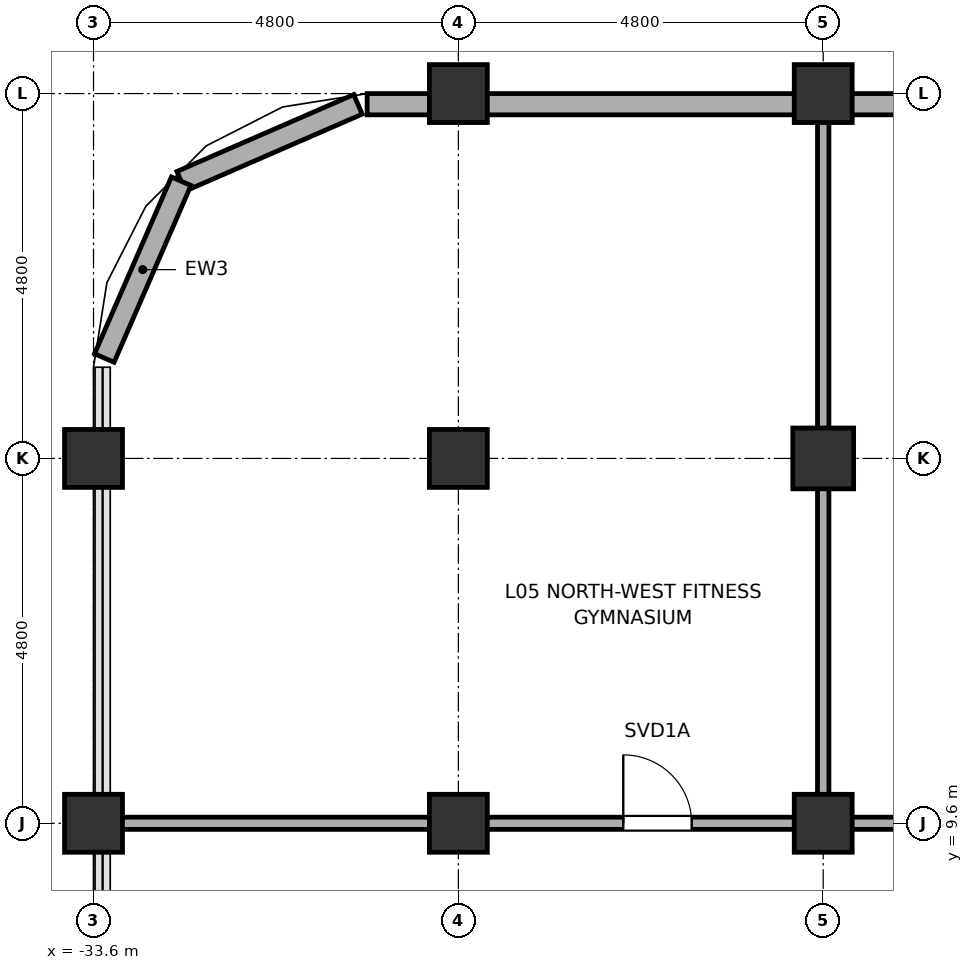
"""IFC4 building model, lengths in metres.
Left out: names, types, materials, properties, quantities, classifications, styles, units other than length and angle.
Written with IfcOpenShell. Run it as: python <this file> out.ifc"""

import sys

from ifc_helpers import new_model, si_unit, direction, frame, frame_2d, origin, origin_2d, place, context, subcontext, project, spatial, rectangle, hollow_rectangle, hollow_circle, extrude, element, fill, save


model = new_model("IFC4")
c1 = context("Model", 3, precision=1e-05, world=origin(), true_north=direction((0.0, 1.0)))
c2 = subcontext(c1, "Body", "Model", "MODEL_VIEW")
j1 = project(units=[si_unit("LENGTHUNIT", "METRE"), si_unit("PLANEANGLEUNIT", "RADIAN")], contexts=[c1])
p1 = place(None, origin())
s1 = spatial("IfcSite", under=j1, at=p1, CompositionType="ELEMENT")
p2 = place(p1, origin())
s2 = spatial("IfcBuilding", under=s1, at=p2, CompositionType="ELEMENT")
p3 = place(p2, frame((0.0, 0.0, 30.0)))
s3 = spatial("IfcBuildingStorey", under=s2, at=p3, CompositionType="ELEMENT", Elevation=30.0)
for number, where, z_axis, x_axis in (
    (1, (-33.6, 9.6, -0.18), (0.0, 0.0, 1.0), (1.0, 0.0, 0.0)),
    (2, (-33.6, 14.4, -0.18), (0.0, 0.0, 1.0), (1.0, 0.0, 0.0)),
):
    element("IfcColumn", number, at=place(p3, frame(where, z_axis=z_axis, x_axis=x_axis)), inside=s3, PredefinedType="COLUMN", context=c2, shape_type="SweptSolid", body=[
        extrude(hollow_circle(Radius=0.381, WallThickness=0.032, at=origin_2d()), origin(), (0.0, 0.0, 1.0), 3.88),
    ])
for number, where, z_axis, x_axis in (
    (3, (-28.8, 9.6, 0.0), (0.0, 0.0, 1.0), (1.0, 0.0, 0.0)),
    (4, (-28.8, 14.4, 0.0), (0.0, 0.0, 1.0), (1.0, 0.0, 0.0)),
    (5, (-28.8, 19.2, 0.0), (0.0, 0.0, 1.0), (1.0, 0.0, 0.0)),
    (6, (-24.0, 9.6, 0.0), (0.0, 0.0, 1.0), (1.0, 0.0, 0.0)),
):
    element("IfcColumn", number, at=place(p3, frame(where, z_axis=z_axis, x_axis=x_axis)), inside=s3, PredefinedType="COLUMN", context=c2, shape_type="SweptSolid", body=[
        extrude(hollow_circle(Radius=0.381, WallThickness=0.032, at=origin_2d()), origin(), (0.0, 0.0, 1.0), 3.7),
    ])
p4 = place(p3, frame((-24.0, 14.4, 0.0), z_axis=(0.0, 0.0, 1.0), x_axis=(1.0, 0.0, 0.0)))
e7 = element("IfcColumn", 7, at=p4, inside=s3, PredefinedType="COLUMN", context=c2, shape_type="SweptSolid", body=[
    extrude(hollow_rectangle(XDim=0.8, YDim=0.8, WallThickness=0.036, at=origin_2d()), origin(), (0.0, 0.0, 1.0), 3.7),
])
p5 = place(p3, frame((-24.0, 19.2, 0.0), z_axis=(0.0, 0.0, 1.0), x_axis=(1.0, 0.0, 0.0)))
e8 = element("IfcColumn", 8, at=p5, inside=s3, PredefinedType="COLUMN", context=c2, shape_type="SweptSolid", body=[
    extrude(hollow_circle(Radius=0.381, WallThickness=0.032, at=origin_2d()), origin(), (0.0, 0.0, 1.0), 3.7),
])
p6 = place(p3, frame((-30.121, 19.058, 0.0), z_axis=(0.0, 0.0, 1.0), x_axis=(-0.917060872934, -0.398747232384, 0.0)))
e9 = element("IfcWall", 9, at=p6, inside=s3, PredefinedType="SOLIDWALL", context=c2, shape_type="SweptSolid", body=[
    extrude(rectangle(XDim=2.536, YDim=0.28, at=frame_2d((1.268, 0.0))), origin(), (0.0, 0.0, 1.0), 2.12),
])
p7 = place(p3, frame((-32.447, 18.047, 0.0), z_axis=(0.0, 0.0, 1.0), x_axis=(-0.398792985289, -0.917040977756, 0.0)))
e10 = element("IfcWall", 10, at=p7, inside=s3, PredefinedType="SOLIDWALL", context=c2, shape_type="SweptSolid", body=[
    extrude(rectangle(XDim=2.536, YDim=0.28, at=frame_2d((1.268, 0.0))), origin(), (0.0, 0.0, 1.0), 2.12),
])
p8 = place(p3, frame((-30.0, 19.06, 0.0), z_axis=(0.0, 0.0, 1.0), x_axis=(1.0, 0.0, 0.0)))
e11 = element("IfcWall", 11, at=p8, inside=s3, PredefinedType="SOLIDWALL", context=c2, shape_type="SweptSolid", body=[
    extrude(rectangle(XDim=25.25, YDim=0.28, at=frame_2d((12.625, 0.0))), origin(), (0.0, 0.0, 1.0), 2.12),
])
p9 = place(p8, frame((17.1, 0.0, 0.0)))
e12 = element("IfcOpeningElement", 12, at=p9, cuts=e11, PredefinedType="OPENING", context=c2, shape_type="SweptSolid", body=[
    extrude(rectangle(XDim=1.8, YDim=2.02, at=frame_2d((0.9, 1.01))), frame((0.0, 0.155, 0.0), z_axis=(0.0, -1.0, 0.0), x_axis=(1.0, 0.0, 0.0)), (0.0, 0.0, 1.0), 0.31),
])
p10 = place(p8, frame((9.0, 0.0, 0.75)))
e13 = element("IfcOpeningElement", 13, at=p10, cuts=e11, PredefinedType="OPENING", context=c2, shape_type="SweptSolid", body=[
    extrude(rectangle(XDim=1.2, YDim=1.15, at=frame_2d((0.6, 0.575))), frame((0.0, 0.155, 0.0), z_axis=(0.0, -1.0, 0.0), x_axis=(1.0, 0.0, 0.0)), (0.0, 0.0, 1.0), 0.31),
])
p11 = place(p8, frame((12.3, 0.0, 0.75)))
e14 = element("IfcOpeningElement", 14, at=p11, cuts=e11, PredefinedType="OPENING", context=c2, shape_type="SweptSolid", body=[
    extrude(rectangle(XDim=1.8, YDim=1.15, at=frame_2d((0.9, 0.575))), frame((0.0, 0.155, 0.0), z_axis=(0.0, -1.0, 0.0), x_axis=(1.0, 0.0, 0.0)), (0.0, 0.0, 1.0), 0.31),
])
p12 = place(p8, frame((21.9, 0.0, 0.75)))
e15 = element("IfcOpeningElement", 15, at=p12, cuts=e11, PredefinedType="OPENING", context=c2, shape_type="SweptSolid", body=[
    extrude(rectangle(XDim=1.8, YDim=1.15, at=frame_2d((0.9, 0.575))), frame((0.0, 0.155, 0.0), z_axis=(0.0, -1.0, 0.0), x_axis=(1.0, 0.0, 0.0)), (0.0, 0.0, 1.0), 0.31),
])
p13 = place(p3, frame((-33.43, 9.6, 0.0), z_axis=(0.0, 0.0, 1.0), x_axis=(1.0, 0.0, 0.0)))
e16 = element("IfcWall", 16, at=p13, inside=s3, PredefinedType="PARTITIONING", context=c2, shape_type="SweptSolid", body=[
    extrude(rectangle(XDim=62.06, YDim=0.16, at=frame_2d((31.03, 0.0))), origin(), (0.0, 0.0, 1.0), 2.12),
])
p14 = place(p13, frame((6.8, 0.0, 0.0)))
e17 = element("IfcOpeningElement", 17, at=p14, cuts=e16, PredefinedType="OPENING", context=c2, shape_type="SweptSolid", body=[
    extrude(rectangle(XDim=0.9, YDim=2.02, at=frame_2d((0.45, 1.01))), frame((0.0, 0.095, 0.0), z_axis=(0.0, -1.0, 0.0), x_axis=(1.0, 0.0, 0.0)), (0.0, 0.0, 1.0), 0.19),
])
p15 = place(p13, frame((54.361, 0.0, 0.0)))
e18 = element("IfcOpeningElement", 18, at=p15, cuts=e16, PredefinedType="OPENING", context=c2, shape_type="SweptSolid", body=[
    extrude(rectangle(XDim=0.9, YDim=2.02, at=frame_2d((0.45, 1.01))), frame((0.0, 0.095, 0.0), z_axis=(0.0, -1.0, 0.0), x_axis=(1.0, 0.0, 0.0)), (0.0, 0.0, 1.0), 0.19),
])
p16 = place(p13, frame((10.69, 0.0, 0.0)))
e19 = element("IfcOpeningElement", 19, at=p16, cuts=e16, PredefinedType="OPENING", context=c2, shape_type="SweptSolid", body=[
    extrude(rectangle(XDim=0.9, YDim=2.02, at=frame_2d((0.45, 1.01))), frame((0.0, 0.095, 0.0), z_axis=(0.0, -1.0, 0.0), x_axis=(1.0, 0.0, 0.0)), (0.0, 0.0, 1.0), 0.19),
])
p17 = place(p13, frame((12.07, 0.0, 0.0)))
e20 = element("IfcOpeningElement", 20, at=p17, cuts=e16, PredefinedType="OPENING", context=c2, shape_type="SweptSolid", body=[
    extrude(rectangle(XDim=0.9, YDim=2.02, at=frame_2d((0.45, 1.01))), frame((0.0, 0.095, 0.0), z_axis=(0.0, -1.0, 0.0), x_axis=(1.0, 0.0, 0.0)), (0.0, 0.0, 1.0), 0.19),
])
p18 = place(p13, frame((17.235, 0.0, 0.0)))
e21 = element("IfcOpeningElement", 21, at=p18, cuts=e16, PredefinedType="OPENING", context=c2, shape_type="SweptSolid", body=[
    extrude(rectangle(XDim=0.92, YDim=2.02, at=frame_2d((0.46, 1.01))), frame((0.0, 0.095, 0.0), z_axis=(0.0, -1.0, 0.0), x_axis=(1.0, 0.0, 0.0)), (0.0, 0.0, 1.0), 0.19),
])
p19 = place(p13, frame((19.905, 0.0, 0.0)))
e22 = element("IfcOpeningElement", 22, at=p19, cuts=e16, PredefinedType="OPENING", context=c2, shape_type="SweptSolid", body=[
    extrude(rectangle(XDim=0.92, YDim=2.02, at=frame_2d((0.46, 1.01))), frame((0.0, 0.095, 0.0), z_axis=(0.0, -1.0, 0.0), x_axis=(1.0, 0.0, 0.0)), (0.0, 0.0, 1.0), 0.19),
])
p20 = place(p13, frame((26.835, 0.0, 0.0)))
e23 = element("IfcOpeningElement", 23, at=p20, cuts=e16, PredefinedType="OPENING", context=c2, shape_type="SweptSolid", body=[
    extrude(rectangle(XDim=0.92, YDim=2.02, at=frame_2d((0.46, 1.01))), frame((0.0, 0.095, 0.0), z_axis=(0.0, -1.0, 0.0), x_axis=(1.0, 0.0, 0.0)), (0.0, 0.0, 1.0), 0.19),
])
p21 = place(p13, frame((29.505, 0.0, 0.0)))
e24 = element("IfcOpeningElement", 24, at=p21, cuts=e16, PredefinedType="OPENING", context=c2, shape_type="SweptSolid", body=[
    extrude(rectangle(XDim=0.92, YDim=2.02, at=frame_2d((0.46, 1.01))), frame((0.0, 0.095, 0.0), z_axis=(0.0, -1.0, 0.0), x_axis=(1.0, 0.0, 0.0)), (0.0, 0.0, 1.0), 0.19),
])
p22 = place(p13, frame((36.435, 0.0, 0.0)))
e25 = element("IfcOpeningElement", 25, at=p22, cuts=e16, PredefinedType="OPENING", context=c2, shape_type="SweptSolid", body=[
    extrude(rectangle(XDim=0.92, YDim=2.02, at=frame_2d((0.46, 1.01))), frame((0.0, 0.095, 0.0), z_axis=(0.0, -1.0, 0.0), x_axis=(1.0, 0.0, 0.0)), (0.0, 0.0, 1.0), 0.19),
])
p23 = place(p13, frame((39.105, 0.0, 0.0)))
e26 = element("IfcOpeningElement", 26, at=p23, cuts=e16, PredefinedType="OPENING", context=c2, shape_type="SweptSolid", body=[
    extrude(rectangle(XDim=0.92, YDim=2.02, at=frame_2d((0.46, 1.01))), frame((0.0, 0.095, 0.0), z_axis=(0.0, -1.0, 0.0), x_axis=(1.0, 0.0, 0.0)), (0.0, 0.0, 1.0), 0.19),
])
p24 = place(p13, frame((46.035, 0.0, 0.0)))
e27 = element("IfcOpeningElement", 27, at=p24, cuts=e16, PredefinedType="OPENING", context=c2, shape_type="SweptSolid", body=[
    extrude(rectangle(XDim=0.92, YDim=2.02, at=frame_2d((0.46, 1.01))), frame((0.0, 0.095, 0.0), z_axis=(0.0, -1.0, 0.0), x_axis=(1.0, 0.0, 0.0)), (0.0, 0.0, 1.0), 0.19),
])
p25 = place(p13, frame((48.705, 0.0, 0.0)))
e28 = element("IfcOpeningElement", 28, at=p25, cuts=e16, PredefinedType="OPENING", context=c2, shape_type="SweptSolid", body=[
    extrude(rectangle(XDim=0.92, YDim=2.02, at=frame_2d((0.46, 1.01))), frame((0.0, 0.095, 0.0), z_axis=(0.0, -1.0, 0.0), x_axis=(1.0, 0.0, 0.0)), (0.0, 0.0, 1.0), 0.19),
])
p26 = place(p3, frame((-24.0, 9.72, 0.0), z_axis=(0.0, 0.0, 1.0), x_axis=(0.0, 1.0, 0.0)))
e29 = element("IfcWall", 29, at=p26, inside=s3, PredefinedType="PARTITIONING", context=c2, shape_type="SweptSolid", body=[
    extrude(rectangle(XDim=9.19, YDim=0.15, at=frame_2d((4.595, 0.0))), origin(), (0.0, 0.0, 1.0), 2.12),
])
p27 = place(p14, origin())
e30 = element("IfcDoor", 30, at=p27, inside=s3, OperationType="SINGLE_SWING_RIGHT", PredefinedType="DOOR", context=c2, shape_type="SweptSolid", body=[
    extrude(rectangle(XDim=0.9, YDim=2.02, at=frame_2d((0.45, 1.01))), frame((0.0, 0.025, 0.0), z_axis=(0.0, -1.0, 0.0), x_axis=(1.0, 0.0, 0.0)), (0.0, 0.0, 1.0), 0.05),
])
fill(e17, e30)
save(model, sys.argv[1])
